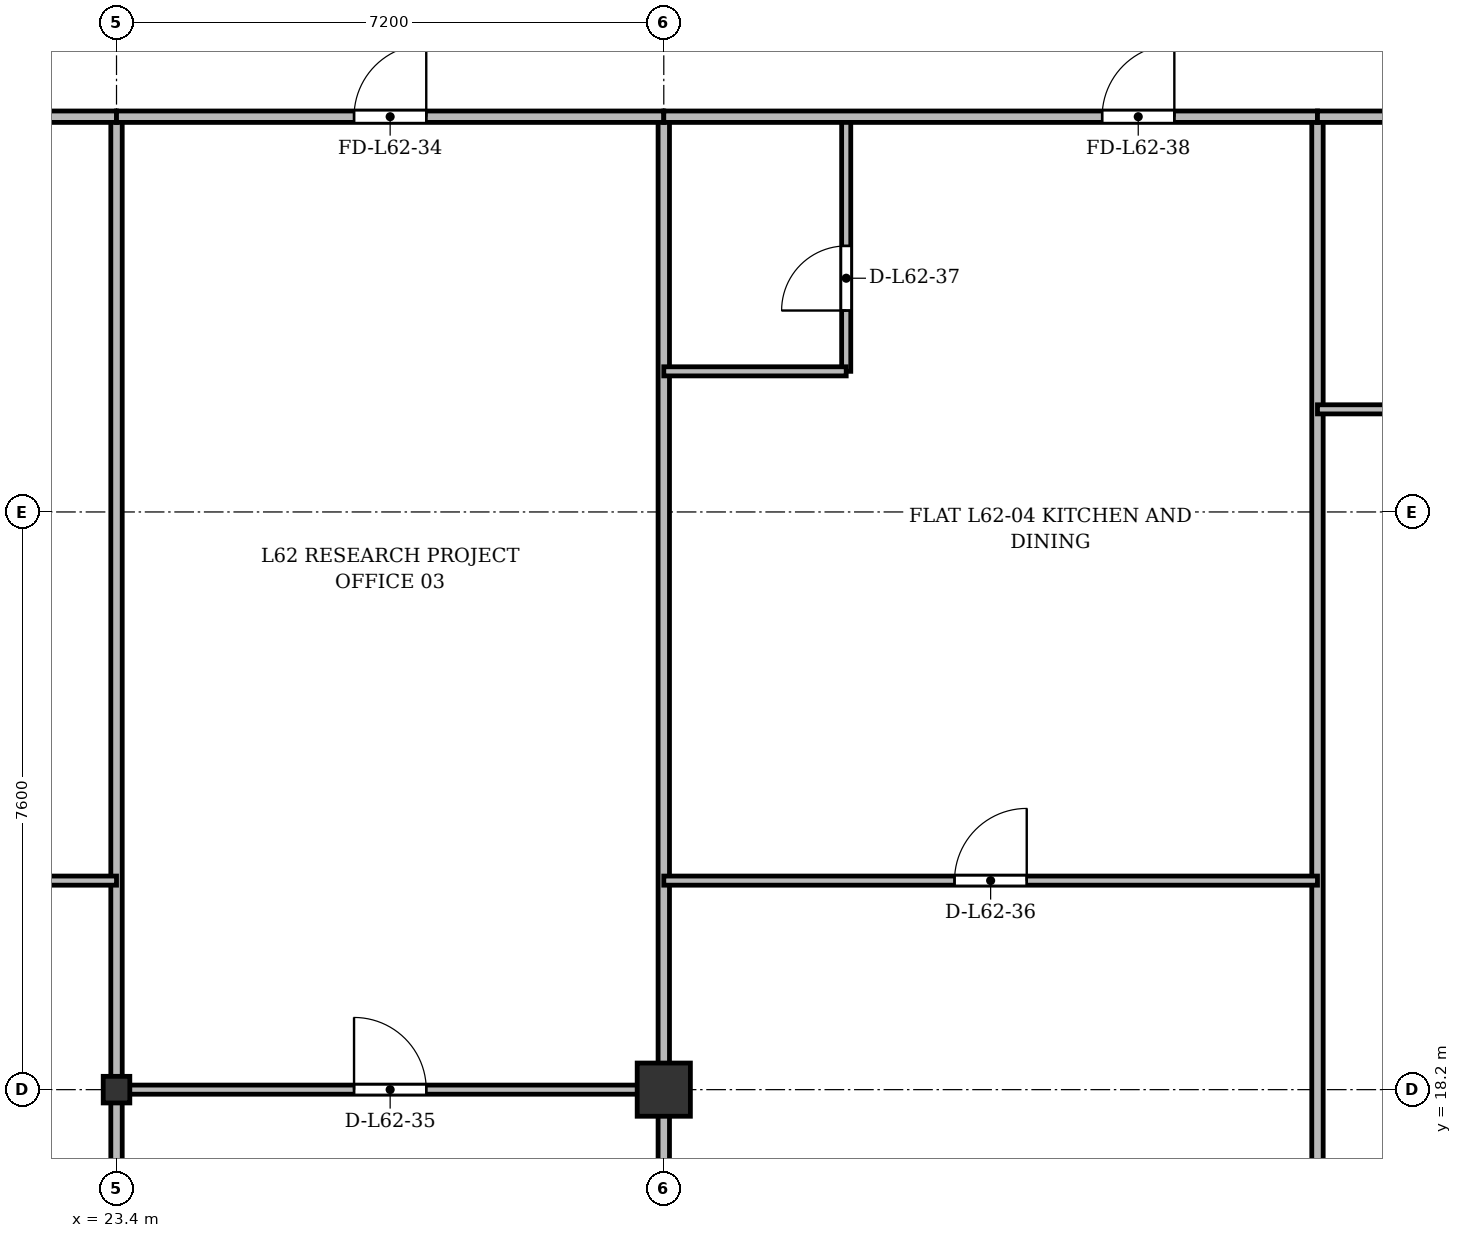
"""IFC4 building model, lengths in metres.
Left out: names, types, materials, properties, quantities, classifications, styles, units other than length and angle.
Written with IfcOpenShell. Run it as: python <this file> out.ifc"""

import sys

from ifc_helpers import new_model, si_unit, direction, frame, frame_2d, origin, origin_2d, place, context, subcontext, project, spatial, rectangle, i_section, extrude, source, transform, mapped, element, fill, save


model = new_model("IFC4")
c1 = context("Model", 3, precision=1e-05, world=origin(), true_north=direction((0.0, 1.0)))
c2 = subcontext(c1, "Body", "Model", "MODEL_VIEW")
j1 = project(units=[si_unit("LENGTHUNIT", "METRE"), si_unit("PLANEANGLEUNIT", "RADIAN")], contexts=[c1])
p1 = place(None, origin())
s1 = spatial("IfcSite", under=j1, at=p1, CompositionType="ELEMENT")
p2 = place(p1, origin())
s2 = spatial("IfcBuilding", under=s1, at=p2, CompositionType="ELEMENT")
p3 = place(p2, frame((0.0, 0.0, 237.3)))
s3 = spatial("IfcBuildingStorey", under=s2, at=p3, CompositionType="ELEMENT", Elevation=237.3)
m1 = source(origin(), c2, "Body", "SweptSolid", [
    extrude(i_section(OverallWidth=0.35, OverallDepth=0.35, WebThickness=0.018, FlangeThickness=0.028, at=origin_2d()), origin(), (0.0, 0.0, 1.0), 3.6),
])
p4 = place(p3, frame((23.4, 18.2, 0.0), z_axis=(0.0, 0.0, 1.0), x_axis=(1.0, 0.0, 0.0)))
e1 = element("IfcColumn", 1, at=p4, inside=s3, PredefinedType="COLUMN", context=c2, shape_type="MappedRepresentation", body=[
    mapped(m1, transform((0.0, 0.0, 0.0), x_axis=(1.0, 0.0, 0.0), y_axis=(0.0, 1.0, 0.0), z_axis=(0.0, 0.0, 1.0), scale=1.0)),
])
m2 = source(origin(), c2, "Body", "SweptSolid", [
    extrude(rectangle(XDim=0.7, YDim=0.7, at=origin_2d()), origin(), (0.0, 0.0, 1.0), 3.6),
])
p5 = place(p3, frame((30.6, 18.2, 0.0), z_axis=(0.0, 0.0, 1.0), x_axis=(1.0, 0.0, 0.0)))
e2 = element("IfcColumn", 2, at=p5, inside=s3, PredefinedType="COLUMN", context=c2, shape_type="MappedRepresentation", body=[
    mapped(m2, transform((0.0, 0.0, 0.0), x_axis=(1.0, 0.0, 0.0), y_axis=(0.0, 1.0, 0.0), z_axis=(0.0, 0.0, 1.0), scale=1.0)),
])
for number, where, z_axis, x_axis in (
    (3, (23.4, 3.625, 0.0), (0.0, 0.0, 1.0), (0.0, 1.0, 0.0)),
    (4, (30.6, 3.625, 0.0), (0.0, 0.0, 1.0), (0.0, 1.0, 0.0)),
):
    element("IfcWall", number, at=place(p3, frame(where, z_axis=z_axis, x_axis=x_axis)), inside=s3, PredefinedType="PARTITIONING", context=c2, shape_type="SweptSolid", body=[
        extrude(rectangle(XDim=27.375, YDim=0.15, at=frame_2d((13.688, 0.0))), origin(), (0.0, 0.0, 1.0), 2.72),
    ])
p6 = place(p3, frame((39.2, 3.625, 0.0), z_axis=(0.0, 0.0, 1.0), x_axis=(0.0, 1.0, 0.0)))
e5 = element("IfcWall", 5, at=p6, inside=s3, PredefinedType="PARTITIONING", context=c2, shape_type="SweptSolid", body=[
    extrude(rectangle(XDim=27.375, YDim=0.15, at=frame_2d((13.688, 0.0))), origin(), (0.0, 0.0, 1.0), 2.77),
])
p7 = place(p3, frame((15.6, 20.95, 0.0), z_axis=(0.0, 0.0, 1.0), x_axis=(1.0, 0.0, 0.0)))
e6 = element("IfcWall", 6, at=p7, inside=s3, PredefinedType="PARTITIONING", context=c2, shape_type="SweptSolid", body=[
    extrude(rectangle(XDim=7.8, YDim=0.12, at=frame_2d((3.9, 0.0))), origin(), (0.0, 0.0, 1.0), 2.72),
])
p8 = place(p7, frame((3.333, 0.0, 0.0)))
e7 = element("IfcOpeningElement", 7, at=p8, cuts=e6, PredefinedType="OPENING", context=c2, shape_type="SweptSolid", body=[
    extrude(rectangle(XDim=0.95, YDim=2.15, at=frame_2d((0.475, 1.075))), frame((0.0, 0.07, 0.0), z_axis=(0.0, -1.0, 0.0), x_axis=(1.0, 0.0, 0.0)), (0.0, 0.0, 1.0), 0.14),
])
p9 = place(p3, frame((15.6, 31.0, 0.0), z_axis=(0.0, 0.0, 1.0), x_axis=(1.0, 0.0, 0.0)))
e8 = element("IfcWall", 8, at=p9, inside=s3, PredefinedType="PARTITIONING", context=c2, shape_type="SweptSolid", body=[
    extrude(rectangle(XDim=7.8, YDim=0.15, at=frame_2d((3.9, 0.0))), origin(), (0.0, 0.0, 1.0), 2.72),
])
p10 = place(p9, frame((5.172, 0.0, 0.0)))
e9 = element("IfcOpeningElement", 9, at=p10, cuts=e8, PredefinedType="OPENING", context=c2, shape_type="SweptSolid", body=[
    extrude(rectangle(XDim=0.95, YDim=2.15, at=frame_2d((0.475, 1.075))), frame((0.0, 0.085, 0.0), z_axis=(0.0, -1.0, 0.0), x_axis=(1.0, 0.0, 0.0)), (0.0, 0.0, 1.0), 0.17),
])
p11 = place(p3, frame((23.4, 31.0, 0.0), z_axis=(0.0, 0.0, 1.0), x_axis=(1.0, 0.0, 0.0)))
e10 = element("IfcWall", 10, at=p11, inside=s3, PredefinedType="PARTITIONING", context=c2, shape_type="SweptSolid", body=[
    extrude(rectangle(XDim=7.2, YDim=0.15, at=frame_2d((3.6, 0.0))), origin(), (0.0, 0.0, 1.0), 2.72),
])
p12 = place(p11, frame((3.125, 0.0, 0.0)))
e11 = element("IfcOpeningElement", 11, at=p12, cuts=e10, PredefinedType="OPENING", context=c2, shape_type="SweptSolid", body=[
    extrude(rectangle(XDim=0.95, YDim=2.15, at=frame_2d((0.475, 1.075))), frame((0.0, 0.085, 0.0), z_axis=(0.0, -1.0, 0.0), x_axis=(1.0, 0.0, 0.0)), (0.0, 0.0, 1.0), 0.17),
])
p13 = place(p3, frame((23.4, 18.2, 0.0), z_axis=(0.0, 0.0, 1.0), x_axis=(1.0, 0.0, 0.0)))
e12 = element("IfcWall", 12, at=p13, inside=s3, PredefinedType="PARTITIONING", context=c2, shape_type="SweptSolid", body=[
    extrude(rectangle(XDim=7.2, YDim=0.12, at=frame_2d((3.6, 0.0))), origin(), (0.0, 0.0, 1.0), 2.77),
])
p14 = place(p13, frame((3.125, 0.0, 0.0)))
e13 = element("IfcOpeningElement", 13, at=p14, cuts=e12, PredefinedType="OPENING", context=c2, shape_type="SweptSolid", body=[
    extrude(rectangle(XDim=0.95, YDim=2.15, at=frame_2d((0.475, 1.075))), frame((0.0, 0.07, 0.0), z_axis=(0.0, -1.0, 0.0), x_axis=(1.0, 0.0, 0.0)), (0.0, 0.0, 1.0), 0.14),
])
p15 = place(p3, frame((30.6, 20.95, 0.0), z_axis=(0.0, 0.0, 1.0), x_axis=(1.0, 0.0, 0.0)))
e14 = element("IfcWall", 14, at=p15, inside=s3, PredefinedType="PARTITIONING", context=c2, shape_type="SweptSolid", body=[
    extrude(rectangle(XDim=8.6, YDim=0.12, at=frame_2d((4.3, 0.0))), origin(), (0.0, 0.0, 1.0), 2.72),
])
p16 = place(p15, frame((3.825, 0.0, 0.0)))
e15 = element("IfcOpeningElement", 15, at=p16, cuts=e14, PredefinedType="OPENING", context=c2, shape_type="SweptSolid", body=[
    extrude(rectangle(XDim=0.95, YDim=2.15, at=frame_2d((0.475, 1.075))), frame((0.0, 0.07, 0.0), z_axis=(0.0, -1.0, 0.0), x_axis=(1.0, 0.0, 0.0)), (0.0, 0.0, 1.0), 0.14),
])
p17 = place(p3, frame((33.0, 27.65, 0.0), z_axis=(0.0, 0.0, 1.0), x_axis=(0.0, 1.0, 0.0)))
e16 = element("IfcWall", 16, at=p17, inside=s3, PredefinedType="PARTITIONING", context=c2, shape_type="SweptSolid", body=[
    extrude(rectangle(XDim=3.35, YDim=0.12, at=frame_2d((1.675, 0.0))), origin(), (0.0, 0.0, 1.0), 3.22),
])
p18 = place(p17, frame((0.8, 0.0, 0.0)))
e17 = element("IfcOpeningElement", 17, at=p18, cuts=e16, PredefinedType="OPENING", context=c2, shape_type="SweptSolid", body=[
    extrude(rectangle(XDim=0.85, YDim=2.1, at=frame_2d((0.425, 1.05))), frame((0.0, 0.07, 0.0), z_axis=(0.0, -1.0, 0.0), x_axis=(1.0, 0.0, 0.0)), (0.0, 0.0, 1.0), 0.14),
])
p19 = place(p3, frame((30.6, 27.65, 0.0), z_axis=(0.0, 0.0, 1.0), x_axis=(1.0, 0.0, 0.0)))
e18 = element("IfcWall", 18, at=p19, inside=s3, PredefinedType="PARTITIONING", context=c2, shape_type="SweptSolid", body=[
    extrude(rectangle(XDim=2.4, YDim=0.12, at=frame_2d((1.2, 0.0))), origin(), (0.0, 0.0, 1.0), 2.72),
])
p20 = place(p3, frame((30.6, 31.0, 0.0), z_axis=(0.0, 0.0, 1.0), x_axis=(1.0, 0.0, 0.0)))
e19 = element("IfcWall", 19, at=p20, inside=s3, PredefinedType="PARTITIONING", context=c2, shape_type="SweptSolid", body=[
    extrude(rectangle(XDim=8.6, YDim=0.15, at=frame_2d((4.3, 0.0))), origin(), (0.0, 0.0, 1.0), 2.72),
])
p21 = place(p20, frame((5.767, 0.0, 0.0)))
e20 = element("IfcOpeningElement", 20, at=p21, cuts=e19, PredefinedType="OPENING", context=c2, shape_type="SweptSolid", body=[
    extrude(rectangle(XDim=0.95, YDim=2.15, at=frame_2d((0.475, 1.075))), frame((0.0, 0.085, 0.0), z_axis=(0.0, -1.0, 0.0), x_axis=(1.0, 0.0, 0.0)), (0.0, 0.0, 1.0), 0.17),
])
p22 = place(p3, frame((39.2, 31.0, 0.0), z_axis=(0.0, 0.0, 1.0), x_axis=(1.0, 0.0, 0.0)))
e21 = element("IfcWall", 21, at=p22, inside=s3, PredefinedType="PARTITIONING", context=c2, shape_type="SweptSolid", body=[
    extrude(rectangle(XDim=4.6, YDim=0.15, at=frame_2d((2.3, 0.0))), origin(), (0.0, 0.0, 1.0), 2.72),
])
p23 = place(p22, frame((1.825, 0.0, 0.0)))
e22 = element("IfcOpeningElement", 22, at=p23, cuts=e21, PredefinedType="OPENING", context=c2, shape_type="SweptSolid", body=[
    extrude(rectangle(XDim=0.95, YDim=2.15, at=frame_2d((0.475, 1.075))), frame((0.0, 0.085, 0.0), z_axis=(0.0, -1.0, 0.0), x_axis=(1.0, 0.0, 0.0)), (0.0, 0.0, 1.0), 0.17),
])
p24 = place(p3, frame((39.2, 27.15, 0.0), z_axis=(0.0, 0.0, 1.0), x_axis=(1.0, 0.0, 0.0)))
e23 = element("IfcWall", 23, at=p24, inside=s3, PredefinedType="PARTITIONING", context=c2, shape_type="SweptSolid", body=[
    extrude(rectangle(XDim=4.6, YDim=0.12, at=frame_2d((2.3, 0.0))), origin(), (0.0, 0.0, 1.0), 2.72),
])
p25 = place(p24, frame((1.825, 0.0, 0.0)))
e24 = element("IfcOpeningElement", 24, at=p25, cuts=e23, PredefinedType="OPENING", context=c2, shape_type="SweptSolid", body=[
    extrude(rectangle(XDim=0.95, YDim=2.15, at=frame_2d((0.475, 1.075))), frame((0.0, 0.07, 0.0), z_axis=(0.0, -1.0, 0.0), x_axis=(1.0, 0.0, 0.0)), (0.0, 0.0, 1.0), 0.14),
])
m3 = source(origin(), c2, "Body", "SweptSolid", [
    extrude(rectangle(XDim=0.95, YDim=2.15, at=frame_2d((0.475, 1.075))), frame((0.0, 0.025, 0.0), z_axis=(0.0, -1.0, 0.0), x_axis=(1.0, 0.0, 0.0)), (0.0, 0.0, 1.0), 0.05),
])
p26 = place(p12, origin())
e25 = element("IfcDoor", 25, at=p26, inside=s3, OperationType="SINGLE_SWING_RIGHT", PredefinedType="DOOR", context=c2, shape_type="MappedRepresentation", body=[
    mapped(m3, transform((0.0, 0.0, 0.0), x_axis=(1.0, 0.0, 0.0), y_axis=(0.0, 1.0, 0.0), z_axis=(0.0, 0.0, 1.0), scale=1.0)),
])
fill(e11, e25)
p27 = place(p14, origin())
e26 = element("IfcDoor", 26, at=p27, inside=s3, OperationType="SINGLE_SWING_LEFT", PredefinedType="DOOR", context=c2, shape_type="MappedRepresentation", body=[
    mapped(m3, transform((0.0, 0.0, 0.0), x_axis=(1.0, 0.0, 0.0), y_axis=(0.0, 1.0, 0.0), z_axis=(0.0, 0.0, 1.0), scale=1.0)),
])
fill(e13, e26)
p28 = place(p16, origin())
e27 = element("IfcDoor", 27, at=p28, inside=s3, OperationType="SINGLE_SWING_RIGHT", PredefinedType="DOOR", context=c2, shape_type="MappedRepresentation", body=[
    mapped(m3, transform((0.0, 0.0, 0.0), x_axis=(1.0, 0.0, 0.0), y_axis=(0.0, 1.0, 0.0), z_axis=(0.0, 0.0, 1.0), scale=1.0)),
])
fill(e15, e27)
m4 = source(origin(), c2, "Body", "SweptSolid", [
    extrude(rectangle(XDim=0.85, YDim=2.1, at=frame_2d((0.425, 1.05))), frame((0.0, 0.025, 0.0), z_axis=(0.0, -1.0, 0.0), x_axis=(1.0, 0.0, 0.0)), (0.0, 0.0, 1.0), 0.05),
])
p29 = place(p18, origin())
e28 = element("IfcDoor", 28, at=p29, inside=s3, OperationType="SINGLE_SWING_LEFT", PredefinedType="DOOR", context=c2, shape_type="MappedRepresentation", body=[
    mapped(m4, transform((0.0, 0.0, 0.0), x_axis=(1.0, 0.0, 0.0), y_axis=(0.0, 1.0, 0.0), z_axis=(0.0, 0.0, 1.0), scale=1.0)),
])
fill(e17, e28)
p30 = place(p21, origin())
e29 = element("IfcDoor", 29, at=p30, inside=s3, OperationType="SINGLE_SWING_RIGHT", PredefinedType="DOOR", context=c2, shape_type="MappedRepresentation", body=[
    mapped(m3, transform((0.0, 0.0, 0.0), x_axis=(1.0, 0.0, 0.0), y_axis=(0.0, 1.0, 0.0), z_axis=(0.0, 0.0, 1.0), scale=1.0)),
])
fill(e20, e29)
save(model, sys.argv[1])
